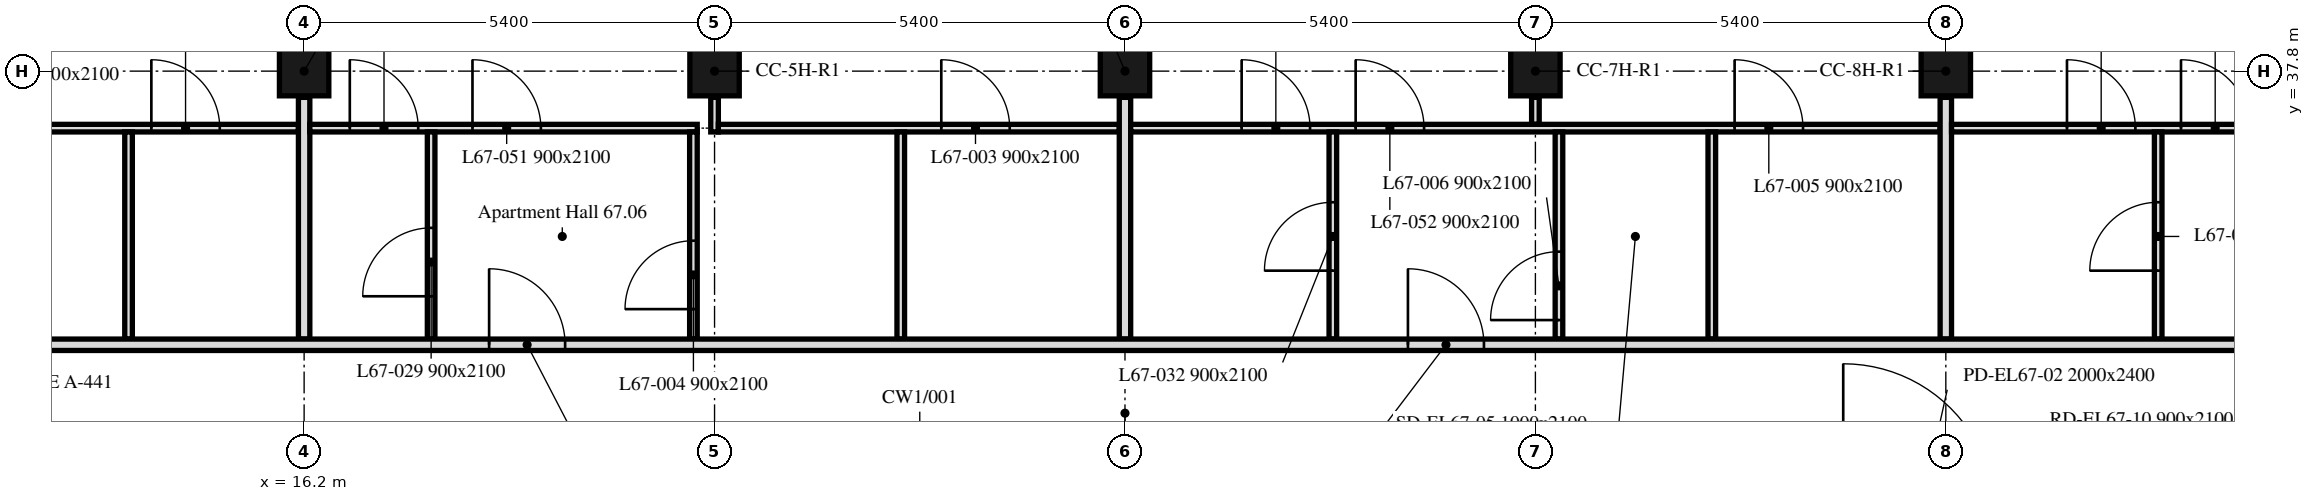
"""IFC4 building model, lengths in metres.
Left out: names, types, materials, properties, quantities, classifications, styles, units other than length and angle.
Written with IfcOpenShell. Run it as: python <this file> out.ifc"""

import sys

from ifc_helpers import new_model, si_unit, direction, frame, frame_2d, origin, origin_2d, place, context, subcontext, project, spatial, rectangle, extrude, element, fill, save


model = new_model("IFC4")
c1 = context("Model", 3, precision=1e-05, world=origin(), true_north=direction((0.0, 1.0)))
c2 = subcontext(c1, "Body", "Model", "MODEL_VIEW")
j1 = project(units=[si_unit("LENGTHUNIT", "METRE"), si_unit("PLANEANGLEUNIT", "RADIAN")], contexts=[c1])
p1 = place(None, origin())
s1 = spatial("IfcSite", under=j1, at=p1, CompositionType="ELEMENT")
p2 = place(p1, origin())
s2 = spatial("IfcBuilding", under=s1, at=p2, CompositionType="ELEMENT")
p3 = place(p2, frame((0.0, 0.0, 275.2)))
s3 = spatial("IfcBuildingStorey", under=s2, at=p3, CompositionType="ELEMENT", Elevation=275.2)
for number, where, z_axis, x_axis in (
    (1, (16.2, 37.8, 0.0), (0.0, 0.0, 1.0), (1.0, 0.0, 0.0)),
    (2, (21.6, 37.8, 0.0), (0.0, 0.0, 1.0), (1.0, 0.0, 0.0)),
    (3, (27.0, 37.8, 0.0), (0.0, 0.0, 1.0), (1.0, 0.0, 0.0)),
    (4, (32.4, 37.8, 0.0), (0.0, 0.0, 1.0), (1.0, 0.0, 0.0)),
    (5, (37.8, 37.8, 0.0), (0.0, 0.0, 1.0), (1.0, 0.0, 0.0)),
):
    element("IfcColumn", number, at=place(p3, frame(where, z_axis=z_axis, x_axis=x_axis)), inside=s3, PredefinedType="COLUMN", context=c2, shape_type="SweptSolid", body=[
        extrude(rectangle(XDim=0.65, YDim=0.65, at=origin_2d()), origin(), (0.0, 0.0, 1.0), 3.0),
    ])
p4 = place(p3, frame((6.151, 37.05, 0.0), z_axis=(0.0, 0.0, 1.0), x_axis=(1.0, 0.0, 0.0)))
e6 = element("IfcWall", 6, at=p4, inside=s3, PredefinedType="PARTITIONING", context=c2, shape_type="SweptSolid", body=[
    extrude(rectangle(XDim=9.974, YDim=0.1, at=frame_2d((4.987, 0.0))), origin(), (0.0, 0.0, 1.0), 3.0),
])
p5 = place(p4, frame((8.039, 0.0, 0.0)))
e7 = element("IfcOpeningElement", 7, at=p5, cuts=e6, PredefinedType="OPENING", context=c2, shape_type="SweptSolid", body=[
    extrude(rectangle(XDim=0.9, YDim=2.1, at=frame_2d((0.45, 1.05))), frame((0.0, 0.05, 0.0), z_axis=(0.0, -1.0, 0.0), x_axis=(1.0, 0.0, 0.0)), (0.0, 0.0, 1.0), 0.1),
])
p6 = place(p4, frame((0.879, 0.0, 0.0)))
e8 = element("IfcOpeningElement", 8, at=p6, cuts=e6, PredefinedType="OPENING", context=c2, shape_type="SweptSolid", body=[
    extrude(rectangle(XDim=0.9, YDim=2.1, at=frame_2d((0.45, 1.05))), frame((0.0, 0.05, 0.0), z_axis=(0.0, -1.0, 0.0), x_axis=(1.0, 0.0, 0.0)), (0.0, 0.0, 1.0), 0.1),
])
p7 = place(p4, frame((2.249, 0.0, 0.0)))
e9 = element("IfcOpeningElement", 9, at=p7, cuts=e6, PredefinedType="OPENING", context=c2, shape_type="SweptSolid", body=[
    extrude(rectangle(XDim=0.9, YDim=2.1, at=frame_2d((0.45, 1.05))), frame((0.0, 0.05, 0.0), z_axis=(0.0, -1.0, 0.0), x_axis=(1.0, 0.0, 0.0)), (0.0, 0.0, 1.0), 0.1),
])
p8 = place(p3, frame((13.89, 34.275, 0.0), z_axis=(0.0, 0.0, 1.0), x_axis=(0.0, 1.0, 0.0)))
e10 = element("IfcWall", 10, at=p8, inside=s3, PredefinedType="PARTITIONING", context=c2, shape_type="SweptSolid", body=[
    extrude(rectangle(XDim=2.725, YDim=0.1, at=frame_2d((1.363, 0.0))), origin(), (0.0, 0.0, 1.0), 3.0),
])
p9 = place(p3, frame((16.2, 34.275, 0.0), z_axis=(0.0, 0.0, 1.0), x_axis=(0.0, 1.0, 0.0)))
e11 = element("IfcWall", 11, at=p9, inside=s3, PredefinedType="PARTITIONING", context=c2, shape_type="SweptSolid", body=[
    extrude(rectangle(XDim=3.18, YDim=0.15, at=frame_2d((1.59, 0.0))), origin(), (0.0, 0.0, 1.0), 3.0),
])
p10 = place(p3, frame((16.275, 37.05, 0.0), z_axis=(0.0, 0.0, 1.0), x_axis=(1.0, 0.0, 0.0)))
e12 = element("IfcWall", 12, at=p10, inside=s3, PredefinedType="PARTITIONING", context=c2, shape_type="SweptSolid", body=[
    extrude(rectangle(XDim=5.097, YDim=0.1, at=frame_2d((2.549, 0.0))), origin(), (0.0, 0.0, 1.0), 3.0),
])
p11 = place(p10, frame((0.526, 0.0, 0.0)))
e13 = element("IfcOpeningElement", 13, at=p11, cuts=e12, PredefinedType="OPENING", context=c2, shape_type="SweptSolid", body=[
    extrude(rectangle(XDim=0.9, YDim=2.1, at=frame_2d((0.45, 1.05))), frame((0.0, 0.05, 0.0), z_axis=(0.0, -1.0, 0.0), x_axis=(1.0, 0.0, 0.0)), (0.0, 0.0, 1.0), 0.1),
])
p12 = place(p10, frame((2.14, 0.0, 0.0)))
e14 = element("IfcOpeningElement", 14, at=p12, cuts=e12, PredefinedType="OPENING", context=c2, shape_type="SweptSolid", body=[
    extrude(rectangle(XDim=0.9, YDim=2.1, at=frame_2d((0.45, 1.05))), frame((0.0, 0.05, 0.0), z_axis=(0.0, -1.0, 0.0), x_axis=(1.0, 0.0, 0.0)), (0.0, 0.0, 1.0), 0.1),
])
p13 = place(p3, frame((21.6, 37.0, 0.0), z_axis=(0.0, 0.0, 1.0), x_axis=(0.0, 1.0, 0.0)))
e15 = element("IfcWall", 15, at=p13, inside=s3, PredefinedType="PARTITIONING", context=c2, shape_type="SweptSolid", body=[
    extrude(rectangle(XDim=0.455, YDim=0.1, at=frame_2d((0.228, 0.0))), origin(), (0.0, 0.0, 1.0), 3.0),
])
p14 = place(p3, frame((21.65, 37.05, 0.0), z_axis=(0.0, 0.0, 1.0), x_axis=(1.0, 0.0, 0.0)))
e16 = element("IfcWall", 16, at=p14, inside=s3, PredefinedType="PARTITIONING", context=c2, shape_type="SweptSolid", body=[
    extrude(rectangle(XDim=5.275, YDim=0.1, at=frame_2d((2.638, 0.0))), origin(), (0.0, 0.0, 1.0), 3.0),
])
p15 = place(p14, frame((2.933, 0.0, 0.0)))
e17 = element("IfcOpeningElement", 17, at=p15, cuts=e16, PredefinedType="OPENING", context=c2, shape_type="SweptSolid", body=[
    extrude(rectangle(XDim=0.9, YDim=2.1, at=frame_2d((0.45, 1.05))), frame((0.0, 0.05, 0.0), z_axis=(0.0, -1.0, 0.0), x_axis=(1.0, 0.0, 0.0)), (0.0, 0.0, 1.0), 0.1),
])
p16 = place(p3, frame((17.871, 34.275, 0.0), z_axis=(0.0, 0.0, 1.0), x_axis=(0.0, 1.0, 0.0)))
e18 = element("IfcWall", 18, at=p16, inside=s3, PredefinedType="PARTITIONING", context=c2, shape_type="SweptSolid", body=[
    extrude(rectangle(XDim=2.725, YDim=0.1, at=frame_2d((1.363, 0.0))), origin(), (0.0, 0.0, 1.0), 3.0),
])
p17 = place(p16, frame((0.563, 0.0, 0.0)))
e19 = element("IfcOpeningElement", 19, at=p17, cuts=e18, PredefinedType="OPENING", context=c2, shape_type="SweptSolid", body=[
    extrude(rectangle(XDim=0.9, YDim=2.1, at=frame_2d((0.45, 1.05))), frame((0.0, 0.05, 0.0), z_axis=(0.0, -1.0, 0.0), x_axis=(1.0, 0.0, 0.0)), (0.0, 0.0, 1.0), 0.1),
])
p18 = place(p3, frame((21.322, 34.275, 0.0), z_axis=(0.0, 0.0, 1.0), x_axis=(0.0, 1.0, 0.0)))
e20 = element("IfcWall", 20, at=p18, inside=s3, PredefinedType="PARTITIONING", context=c2, shape_type="SweptSolid", body=[
    extrude(rectangle(XDim=2.725, YDim=0.1, at=frame_2d((1.363, 0.0))), origin(), (0.0, 0.0, 1.0), 3.0),
])
p19 = place(p18, frame((0.394, 0.0, 0.0)))
e21 = element("IfcOpeningElement", 21, at=p19, cuts=e20, PredefinedType="OPENING", context=c2, shape_type="SweptSolid", body=[
    extrude(rectangle(XDim=0.9, YDim=2.1, at=frame_2d((0.45, 1.05))), frame((0.0, 0.05, 0.0), z_axis=(0.0, -1.0, 0.0), x_axis=(1.0, 0.0, 0.0)), (0.0, 0.0, 1.0), 0.1),
])
p20 = place(p3, frame((24.05, 34.275, 0.0), z_axis=(0.0, 0.0, 1.0), x_axis=(0.0, 1.0, 0.0)))
e22 = element("IfcWall", 22, at=p20, inside=s3, PredefinedType="PARTITIONING", context=c2, shape_type="SweptSolid", body=[
    extrude(rectangle(XDim=2.725, YDim=0.1, at=frame_2d((1.363, 0.0))), origin(), (0.0, 0.0, 1.0), 3.0),
])
p21 = place(p3, frame((27.0, 34.275, 0.0), z_axis=(0.0, 0.0, 1.0), x_axis=(0.0, 1.0, 0.0)))
e23 = element("IfcWall", 23, at=p21, inside=s3, PredefinedType="PARTITIONING", context=c2, shape_type="SweptSolid", body=[
    extrude(rectangle(XDim=3.18, YDim=0.15, at=frame_2d((1.59, 0.0))), origin(), (0.0, 0.0, 1.0), 3.0),
])
p22 = place(p3, frame((32.4, 37.1, 0.0), z_axis=(0.0, 0.0, 1.0), x_axis=(0.0, 1.0, 0.0)))
e24 = element("IfcWall", 24, at=p22, inside=s3, PredefinedType="PARTITIONING", context=c2, shape_type="SweptSolid", body=[
    extrude(rectangle(XDim=0.355, YDim=0.1, at=frame_2d((0.177, 0.0))), origin(), (0.0, 0.0, 1.0), 3.0),
])
p23 = place(p3, frame((27.075, 37.05, 0.0), z_axis=(0.0, 0.0, 1.0), x_axis=(1.0, 0.0, 0.0)))
e25 = element("IfcWall", 25, at=p23, inside=s3, PredefinedType="PARTITIONING", context=c2, shape_type="SweptSolid", body=[
    extrude(rectangle(XDim=10.65, YDim=0.1, at=frame_2d((5.325, 0.0))), origin(), (0.0, 0.0, 1.0), 3.0),
])
p24 = place(p23, frame((7.946, 0.0, 0.0)))
e26 = element("IfcOpeningElement", 26, at=p24, cuts=e25, PredefinedType="OPENING", context=c2, shape_type="SweptSolid", body=[
    extrude(rectangle(XDim=0.9, YDim=2.1, at=frame_2d((0.45, 1.05))), frame((0.0, 0.05, 0.0), z_axis=(0.0, -1.0, 0.0), x_axis=(1.0, 0.0, 0.0)), (0.0, 0.0, 1.0), 0.1),
])
p25 = place(p23, frame((1.46, 0.0, 0.0)))
e27 = element("IfcOpeningElement", 27, at=p25, cuts=e25, PredefinedType="OPENING", context=c2, shape_type="SweptSolid", body=[
    extrude(rectangle(XDim=0.9, YDim=2.1, at=frame_2d((0.45, 1.05))), frame((0.0, 0.05, 0.0), z_axis=(0.0, -1.0, 0.0), x_axis=(1.0, 0.0, 0.0)), (0.0, 0.0, 1.0), 0.1),
])
p26 = place(p23, frame((2.96, 0.0, 0.0)))
e28 = element("IfcOpeningElement", 28, at=p26, cuts=e25, PredefinedType="OPENING", context=c2, shape_type="SweptSolid", body=[
    extrude(rectangle(XDim=0.9, YDim=2.1, at=frame_2d((0.45, 1.05))), frame((0.0, 0.05, 0.0), z_axis=(0.0, -1.0, 0.0), x_axis=(1.0, 0.0, 0.0)), (0.0, 0.0, 1.0), 0.1),
])
p27 = place(p3, frame((29.735, 34.275, 0.0), z_axis=(0.0, 0.0, 1.0), x_axis=(0.0, 1.0, 0.0)))
e29 = element("IfcWall", 29, at=p27, inside=s3, PredefinedType="PARTITIONING", context=c2, shape_type="SweptSolid", body=[
    extrude(rectangle(XDim=2.725, YDim=0.1, at=frame_2d((1.363, 0.0))), origin(), (0.0, 0.0, 1.0), 3.0),
])
p28 = place(p27, frame((0.9, 0.0, 0.0)))
e30 = element("IfcOpeningElement", 30, at=p28, cuts=e29, PredefinedType="OPENING", context=c2, shape_type="SweptSolid", body=[
    extrude(rectangle(XDim=0.9, YDim=2.1, at=frame_2d((0.45, 1.05))), frame((0.0, 0.05, 0.0), z_axis=(0.0, -1.0, 0.0), x_axis=(1.0, 0.0, 0.0)), (0.0, 0.0, 1.0), 0.1),
])
p29 = place(p3, frame((32.71, 34.275, 0.0), z_axis=(0.0, 0.0, 1.0), x_axis=(0.0, 1.0, 0.0)))
e31 = element("IfcWall", 31, at=p29, inside=s3, PredefinedType="PARTITIONING", context=c2, shape_type="SweptSolid", body=[
    extrude(rectangle(XDim=2.725, YDim=0.1, at=frame_2d((1.363, 0.0))), origin(), (0.0, 0.0, 1.0), 3.0),
])
p30 = place(p29, frame((0.25, 0.0, 0.0)))
e32 = element("IfcOpeningElement", 32, at=p30, cuts=e31, PredefinedType="OPENING", context=c2, shape_type="SweptSolid", body=[
    extrude(rectangle(XDim=0.9, YDim=2.1, at=frame_2d((0.45, 1.05))), frame((0.0, 0.05, 0.0), z_axis=(0.0, -1.0, 0.0), x_axis=(1.0, 0.0, 0.0)), (0.0, 0.0, 1.0), 0.1),
])
p31 = place(p3, frame((34.721, 34.275, 0.0), z_axis=(0.0, 0.0, 1.0), x_axis=(0.0, 1.0, 0.0)))
e33 = element("IfcWall", 33, at=p31, inside=s3, PredefinedType="PARTITIONING", context=c2, shape_type="SweptSolid", body=[
    extrude(rectangle(XDim=2.725, YDim=0.1, at=frame_2d((1.363, 0.0))), origin(), (0.0, 0.0, 1.0), 3.0),
])
p32 = place(p3, frame((37.8, 34.275, 0.0), z_axis=(0.0, 0.0, 1.0), x_axis=(0.0, 1.0, 0.0)))
e34 = element("IfcWall", 34, at=p32, inside=s3, PredefinedType="PARTITIONING", context=c2, shape_type="SweptSolid", body=[
    extrude(rectangle(XDim=3.18, YDim=0.15, at=frame_2d((1.59, 0.0))), origin(), (0.0, 0.0, 1.0), 3.0),
])
p33 = place(p3, frame((37.875, 37.05, 0.0), z_axis=(0.0, 0.0, 1.0), x_axis=(1.0, 0.0, 0.0)))
e35 = element("IfcWall", 35, at=p33, inside=s3, PredefinedType="PARTITIONING", context=c2, shape_type="SweptSolid", body=[
    extrude(rectangle(XDim=9.974, YDim=0.1, at=frame_2d((4.987, 0.0))), origin(), (0.0, 0.0, 1.0), 3.0),
])
p34 = place(p33, frame((1.519, 0.0, 0.0)))
e36 = element("IfcOpeningElement", 36, at=p34, cuts=e35, PredefinedType="OPENING", context=c2, shape_type="SweptSolid", body=[
    extrude(rectangle(XDim=0.9, YDim=2.1, at=frame_2d((0.45, 1.05))), frame((0.0, 0.05, 0.0), z_axis=(0.0, -1.0, 0.0), x_axis=(1.0, 0.0, 0.0)), (0.0, 0.0, 1.0), 0.1),
])
p35 = place(p33, frame((3.019, 0.0, 0.0)))
e37 = element("IfcOpeningElement", 37, at=p35, cuts=e35, PredefinedType="OPENING", context=c2, shape_type="SweptSolid", body=[
    extrude(rectangle(XDim=0.9, YDim=2.1, at=frame_2d((0.45, 1.05))), frame((0.0, 0.05, 0.0), z_axis=(0.0, -1.0, 0.0), x_axis=(1.0, 0.0, 0.0)), (0.0, 0.0, 1.0), 0.1),
])
p36 = place(p3, frame((40.594, 34.275, 0.0), z_axis=(0.0, 0.0, 1.0), x_axis=(0.0, 1.0, 0.0)))
e38 = element("IfcWall", 38, at=p36, inside=s3, PredefinedType="PARTITIONING", context=c2, shape_type="SweptSolid", body=[
    extrude(rectangle(XDim=2.725, YDim=0.1, at=frame_2d((1.363, 0.0))), origin(), (0.0, 0.0, 1.0), 3.0),
])
p37 = place(p36, frame((0.9, 0.0, 0.0)))
e39 = element("IfcOpeningElement", 39, at=p37, cuts=e38, PredefinedType="OPENING", context=c2, shape_type="SweptSolid", body=[
    extrude(rectangle(XDim=0.9, YDim=2.1, at=frame_2d((0.45, 1.05))), frame((0.0, 0.05, 0.0), z_axis=(0.0, -1.0, 0.0), x_axis=(1.0, 0.0, 0.0)), (0.0, 0.0, 1.0), 0.1),
])
p38 = place(p3, frame((6.151, 34.2, 0.0), z_axis=(0.0, 0.0, 1.0), x_axis=(1.0, 0.0, 0.0)))
e40 = element("IfcWall", 40, at=p38, inside=s3, PredefinedType="PARTITIONING", context=c2, shape_type="SweptSolid", body=[
    extrude(rectangle(XDim=41.698, YDim=0.15, at=frame_2d((20.849, 0.0))), origin(), (0.0, 0.0, 1.0), 3.0),
])
p39 = place(p38, frame((3.369, 0.0, 0.0)))
e41 = element("IfcOpeningElement", 41, at=p39, cuts=e40, PredefinedType="OPENING", context=c2, shape_type="SweptSolid", body=[
    extrude(rectangle(XDim=1.0, YDim=2.1, at=frame_2d((0.5, 1.05))), frame((0.0, 0.075, 0.0), z_axis=(0.0, -1.0, 0.0), x_axis=(1.0, 0.0, 0.0)), (0.0, 0.0, 1.0), 0.15),
])
p40 = place(p38, frame((12.483, 0.0, 0.0)))
e42 = element("IfcOpeningElement", 42, at=p40, cuts=e40, PredefinedType="OPENING", context=c2, shape_type="SweptSolid", body=[
    extrude(rectangle(XDim=1.0, YDim=2.1, at=frame_2d((0.5, 1.05))), frame((0.0, 0.075, 0.0), z_axis=(0.0, -1.0, 0.0), x_axis=(1.0, 0.0, 0.0)), (0.0, 0.0, 1.0), 0.15),
])
p41 = place(p38, frame((24.572, 0.0, 0.0)))
e43 = element("IfcOpeningElement", 43, at=p41, cuts=e40, PredefinedType="OPENING", context=c2, shape_type="SweptSolid", body=[
    extrude(rectangle(XDim=1.0, YDim=2.1, at=frame_2d((0.5, 1.05))), frame((0.0, 0.075, 0.0), z_axis=(0.0, -1.0, 0.0), x_axis=(1.0, 0.0, 0.0)), (0.0, 0.0, 1.0), 0.15),
])
p42 = place(p38, frame((35.849, 0.0, 0.0)))
e44 = element("IfcOpeningElement", 44, at=p42, cuts=e40, PredefinedType="OPENING", context=c2, shape_type="SweptSolid", body=[
    extrude(rectangle(XDim=1.0, YDim=2.1, at=frame_2d((0.5, 1.05))), frame((0.0, 0.075, 0.0), z_axis=(0.0, -1.0, 0.0), x_axis=(1.0, 0.0, 0.0)), (0.0, 0.0, 1.0), 0.15),
])
p43 = place(p5, origin())
e45 = element("IfcDoor", 45, at=p43, inside=s3, OperationType="SINGLE_SWING_RIGHT", PredefinedType="DOOR", context=c2, shape_type="SweptSolid", body=[
    extrude(rectangle(XDim=0.9, YDim=2.1, at=frame_2d((0.45, 1.05))), frame((0.0, 0.025, 0.0), z_axis=(0.0, -1.0, 0.0), x_axis=(1.0, 0.0, 0.0)), (0.0, 0.0, 1.0), 0.05),
])
fill(e7, e45)
p44 = place(p15, origin())
e46 = element("IfcDoor", 46, at=p44, inside=s3, OperationType="SINGLE_SWING_RIGHT", PredefinedType="DOOR", context=c2, shape_type="SweptSolid", body=[
    extrude(rectangle(XDim=0.9, YDim=2.1, at=frame_2d((0.45, 1.05))), frame((0.0, 0.025, 0.0), z_axis=(0.0, -1.0, 0.0), x_axis=(1.0, 0.0, 0.0)), (0.0, 0.0, 1.0), 0.05),
])
fill(e17, e46)
p45 = place(p19, origin())
e47 = element("IfcDoor", 47, at=p45, inside=s3, OperationType="SINGLE_SWING_RIGHT", PredefinedType="DOOR", context=c2, shape_type="SweptSolid", body=[
    extrude(rectangle(XDim=0.9, YDim=2.1, at=frame_2d((0.45, 1.05))), frame((0.0, 0.025, 0.0), z_axis=(0.0, -1.0, 0.0), x_axis=(1.0, 0.0, 0.0)), (0.0, 0.0, 1.0), 0.05),
])
fill(e21, e47)
p46 = place(p24, origin())
e48 = element("IfcDoor", 48, at=p46, inside=s3, OperationType="SINGLE_SWING_RIGHT", PredefinedType="DOOR", context=c2, shape_type="SweptSolid", body=[
    extrude(rectangle(XDim=0.9, YDim=2.1, at=frame_2d((0.45, 1.05))), frame((0.0, 0.025, 0.0), z_axis=(0.0, -1.0, 0.0), x_axis=(1.0, 0.0, 0.0)), (0.0, 0.0, 1.0), 0.05),
])
fill(e26, e48)
p47 = place(p30, origin())
e49 = element("IfcDoor", 49, at=p47, inside=s3, OperationType="SINGLE_SWING_LEFT", PredefinedType="DOOR", context=c2, shape_type="SweptSolid", body=[
    extrude(rectangle(XDim=0.9, YDim=2.1, at=frame_2d((0.45, 1.05))), frame((0.0, 0.025, 0.0), z_axis=(0.0, -1.0, 0.0), x_axis=(1.0, 0.0, 0.0)), (0.0, 0.0, 1.0), 0.05),
])
fill(e32, e49)
p48 = place(p11, origin())
e50 = element("IfcDoor", 50, at=p48, inside=s3, OperationType="SINGLE_SWING_LEFT", PredefinedType="DOOR", context=c2, shape_type="SweptSolid", body=[
    extrude(rectangle(XDim=0.9, YDim=2.1, at=frame_2d((0.45, 1.05))), frame((0.0, 0.025, 0.0), z_axis=(0.0, -1.0, 0.0), x_axis=(1.0, 0.0, 0.0)), (0.0, 0.0, 1.0), 0.05),
])
fill(e13, e50)
p49 = place(p17, origin())
e51 = element("IfcDoor", 51, at=p49, inside=s3, OperationType="SINGLE_SWING_RIGHT", PredefinedType="DOOR", context=c2, shape_type="SweptSolid", body=[
    extrude(rectangle(XDim=0.9, YDim=2.1, at=frame_2d((0.45, 1.05))), frame((0.0, 0.025, 0.0), z_axis=(0.0, -1.0, 0.0), x_axis=(1.0, 0.0, 0.0)), (0.0, 0.0, 1.0), 0.05),
])
fill(e19, e51)
p50 = place(p25, origin())
e52 = element("IfcDoor", 52, at=p50, inside=s3, OperationType="SINGLE_SWING_LEFT", PredefinedType="DOOR", context=c2, shape_type="SweptSolid", body=[
    extrude(rectangle(XDim=0.9, YDim=2.1, at=frame_2d((0.45, 1.05))), frame((0.0, 0.025, 0.0), z_axis=(0.0, -1.0, 0.0), x_axis=(1.0, 0.0, 0.0)), (0.0, 0.0, 1.0), 0.05),
])
fill(e27, e52)
p51 = place(p28, origin())
e53 = element("IfcDoor", 53, at=p51, inside=s3, OperationType="SINGLE_SWING_LEFT", PredefinedType="DOOR", context=c2, shape_type="SweptSolid", body=[
    extrude(rectangle(XDim=0.9, YDim=2.1, at=frame_2d((0.45, 1.05))), frame((0.0, 0.025, 0.0), z_axis=(0.0, -1.0, 0.0), x_axis=(1.0, 0.0, 0.0)), (0.0, 0.0, 1.0), 0.05),
])
fill(e30, e53)
p52 = place(p34, origin())
e54 = element("IfcDoor", 54, at=p52, inside=s3, OperationType="SINGLE_SWING_RIGHT", PredefinedType="DOOR", context=c2, shape_type="SweptSolid", body=[
    extrude(rectangle(XDim=0.9, YDim=2.1, at=frame_2d((0.45, 1.05))), frame((0.0, 0.025, 0.0), z_axis=(0.0, -1.0, 0.0), x_axis=(1.0, 0.0, 0.0)), (0.0, 0.0, 1.0), 0.05),
])
fill(e36, e54)
p53 = place(p37, origin())
e55 = element("IfcDoor", 55, at=p53, inside=s3, OperationType="SINGLE_SWING_RIGHT", PredefinedType="DOOR", context=c2, shape_type="SweptSolid", body=[
    extrude(rectangle(XDim=0.9, YDim=2.1, at=frame_2d((0.45, 1.05))), frame((0.0, 0.025, 0.0), z_axis=(0.0, -1.0, 0.0), x_axis=(1.0, 0.0, 0.0)), (0.0, 0.0, 1.0), 0.05),
])
fill(e39, e55)
p54 = place(p12, origin())
e56 = element("IfcDoor", 56, at=p54, inside=s3, OperationType="SINGLE_SWING_RIGHT", PredefinedType="DOOR", context=c2, shape_type="SweptSolid", body=[
    extrude(rectangle(XDim=0.9, YDim=2.1, at=frame_2d((0.45, 1.05))), frame((0.0, 0.025, 0.0), z_axis=(0.0, -1.0, 0.0), x_axis=(1.0, 0.0, 0.0)), (0.0, 0.0, 1.0), 0.05),
])
fill(e14, e56)
p55 = place(p26, origin())
e57 = element("IfcDoor", 57, at=p55, inside=s3, OperationType="SINGLE_SWING_RIGHT", PredefinedType="DOOR", context=c2, shape_type="SweptSolid", body=[
    extrude(rectangle(XDim=0.9, YDim=2.1, at=frame_2d((0.45, 1.05))), frame((0.0, 0.025, 0.0), z_axis=(0.0, -1.0, 0.0), x_axis=(1.0, 0.0, 0.0)), (0.0, 0.0, 1.0), 0.05),
])
fill(e28, e57)
p56 = place(p35, origin())
e58 = element("IfcDoor", 58, at=p56, inside=s3, OperationType="SINGLE_SWING_LEFT", PredefinedType="DOOR", context=c2, shape_type="SweptSolid", body=[
    extrude(rectangle(XDim=0.9, YDim=2.1, at=frame_2d((0.45, 1.05))), frame((0.0, 0.025, 0.0), z_axis=(0.0, -1.0, 0.0), x_axis=(1.0, 0.0, 0.0)), (0.0, 0.0, 1.0), 0.05),
])
fill(e37, e58)
p57 = place(p40, origin())
e59 = element("IfcDoor", 59, at=p57, inside=s3, OperationType="SINGLE_SWING_RIGHT", PredefinedType="DOOR", context=c2, shape_type="SweptSolid", body=[
    extrude(rectangle(XDim=1.0, YDim=2.1, at=frame_2d((0.5, 1.05))), frame((0.0, 0.025, 0.0), z_axis=(0.0, -1.0, 0.0), x_axis=(1.0, 0.0, 0.0)), (0.0, 0.0, 1.0), 0.05),
])
fill(e42, e59)
p58 = place(p41, origin())
e60 = element("IfcDoor", 60, at=p58, inside=s3, OperationType="SINGLE_SWING_LEFT", PredefinedType="DOOR", context=c2, shape_type="SweptSolid", body=[
    extrude(rectangle(XDim=1.0, YDim=2.1, at=frame_2d((0.5, 1.05))), frame((0.0, 0.025, 0.0), z_axis=(0.0, -1.0, 0.0), x_axis=(1.0, 0.0, 0.0)), (0.0, 0.0, 1.0), 0.05),
])
fill(e43, e60)
save(model, sys.argv[1])
